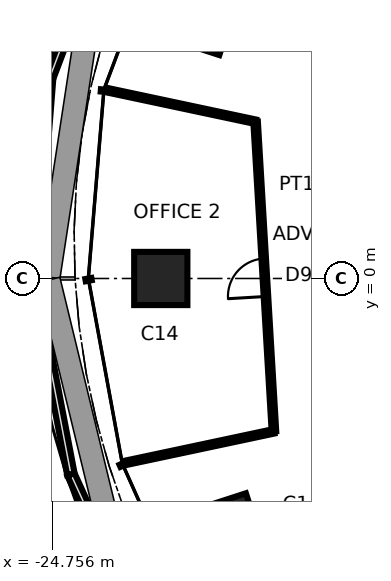
"""IFC4 building model, lengths in metres.
Left out: names, types, materials, properties, quantities, classifications, styles, units other than length and angle.
Written with IfcOpenShell. Run it as: python <this file> out.ifc"""

import sys

from ifc_helpers import new_model, si_unit, direction, frame, frame_2d, origin, origin_2d, place, context, subcontext, project, spatial, rectangle, extrude, element, fill, save


model = new_model("IFC4")
c1 = context("Model", 3, precision=1e-05, world=origin(), true_north=direction((0.0, 1.0)))
c2 = subcontext(c1, "Body", "Model", "MODEL_VIEW")
j1 = project(units=[si_unit("LENGTHUNIT", "METRE"), si_unit("PLANEANGLEUNIT", "RADIAN")], contexts=[c1])
p1 = place(None, origin())
s1 = spatial("IfcSite", under=j1, at=p1, CompositionType="ELEMENT")
p2 = place(p1, origin())
s2 = spatial("IfcBuilding", under=s1, at=p2, CompositionType="ELEMENT")
p3 = place(p2, frame((0.0, 0.0, 172.1)))
s3 = spatial("IfcBuildingStorey", under=s2, at=p3, CompositionType="ELEMENT", Elevation=172.1)
for number, where, z_axis, x_axis in (
    (1, (-20.808, 6.761, 0.0), (0.0, 0.0, 1.0), (-0.951, 0.309, 0.0)),
    (2, (-21.9, 0.0, 0.0), (0.0, 0.0, 1.0), (-1.0, 0.0, 0.0)),
    (3, (-20.109, -6.534, 0.0), (0.0, 0.0, 1.0), (-0.951, -0.309, 0.0)),
):
    element("IfcColumn", number, at=place(p3, frame(where, z_axis=z_axis, x_axis=x_axis)), inside=s3, PredefinedType="COLUMN", context=c2, shape_type="SweptSolid", body=[
        extrude(rectangle(XDim=1.4, YDim=1.4, at=origin_2d()), origin(), (0.0, 0.0, 1.0), 3.9),
    ])
p4 = place(p3, frame((-22.953, 10.219, 0.0), z_axis=(0.0, 0.0, 1.0), x_axis=(-0.354421684857, -0.935085701582, 0.0)))
e4 = element("IfcWall", 4, at=p4, inside=s3, PredefinedType="PARAPET", context=c2, shape_type="SweptSolid", body=[
    extrude(rectangle(XDim=5.285, YDim=0.2, at=frame_2d((2.643, 0.0))), origin(), (0.0, 0.0, 1.0), 1.1),
])
p5 = place(p3, frame((-24.826, 5.277, 0.0), z_axis=(0.0, 0.0, 1.0), x_axis=(-0.079693897205, -0.996819383213, 0.0)))
e5 = element("IfcWall", 5, at=p5, inside=s3, PredefinedType="PARAPET", context=c2, shape_type="SweptSolid", body=[
    extrude(rectangle(XDim=5.294, YDim=0.2, at=frame_2d((2.647, 0.0))), origin(), (0.0, 0.0, 1.0), 1.1),
])
p6 = place(p3, frame((-25.248, 0.0, 0.0), z_axis=(0.0, 0.0, 1.0), x_axis=(0.187479601308, -0.982268496437, 0.0)))
e6 = element("IfcWall", 6, at=p6, inside=s3, PredefinedType="PARAPET", context=c2, shape_type="SweptSolid", body=[
    extrude(rectangle(XDim=5.25, YDim=0.2, at=frame_2d((2.625, 0.0))), origin(), (0.0, 0.0, 1.0), 1.1),
])
p7 = place(p3, frame((-24.264, -5.157, 0.0), z_axis=(0.0, 0.0, 1.0), x_axis=(0.4157564042, -0.909476009781, 0.0)))
e7 = element("IfcWall", 7, at=p7, inside=s3, PredefinedType="PARAPET", context=c2, shape_type="SweptSolid", body=[
    extrude(rectangle(XDim=5.157, YDim=0.2, at=frame_2d((2.579, 0.0))), origin(), (0.0, 0.0, 1.0), 1.1),
])
for number, where, z_axis, x_axis in (
    (8, (-22.835, -4.854, 0.0), (0.0, 0.0, 1.0), (0.978, 0.208, 0.0)),
    (9, (-19.405, 4.125, 0.0), (0.0, 0.0, 1.0), (-0.978, 0.208, 0.0)),
):
    element("IfcWall", number, at=place(p3, frame(where, z_axis=z_axis, x_axis=x_axis)), inside=s3, PredefinedType="PARTITIONING", context=c2, shape_type="SweptSolid", body=[
        extrude(rectangle(XDim=4.0, YDim=0.12, at=frame_2d((2.0, 0.0))), origin(), (0.0, 0.0, 1.0), 3.74),
    ])
p8 = place(p3, frame((-18.922, -4.022, 0.0), z_axis=(0.0, 0.0, 1.0), x_axis=(-0.059083274549, 0.99825305743, 0.0)))
e10 = element("IfcWall", 10, at=p8, inside=s3, PredefinedType="PARTITIONING", context=c2, shape_type="SweptSolid", body=[
    extrude(rectangle(XDim=8.161, YDim=0.12, at=frame_2d((4.081, 0.0))), origin(), (0.0, 0.0, 1.0), 3.334),
])
p9 = place(p8, frame((3.555, 0.0, 0.0)))
e11 = element("IfcOpeningElement", 11, at=p9, cuts=e10, PredefinedType="OPENING", context=c2, shape_type="SweptSolid", body=[
    extrude(rectangle(XDim=1.0, YDim=2.4, at=frame_2d((0.5, 1.2))), frame((0.0, 0.07, 0.0), z_axis=(0.0, -1.0, 0.0), x_axis=(1.0, 0.0, 0.0)), (0.0, 0.0, 1.0), 0.14),
])
p10 = place(p9, origin())
e12 = element("IfcDoor", 12, at=p10, inside=s3, OperationType="SINGLE_SWING_LEFT", PredefinedType="DOOR", context=c2, shape_type="SweptSolid", body=[
    extrude(rectangle(XDim=1.0, YDim=2.4, at=frame_2d((0.5, 1.2))), frame((0.0, 0.025, 0.0), z_axis=(0.0, -1.0, 0.0), x_axis=(1.0, 0.0, 0.0)), (0.0, 0.0, 1.0), 0.05),
])
fill(e11, e12)
save(model, sys.argv[1])
